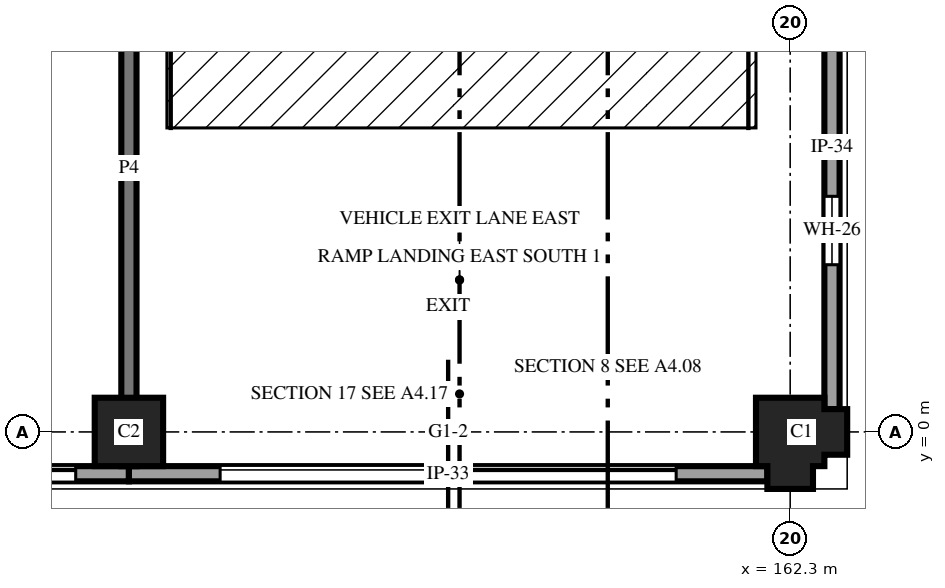
"""IFC4 building model, lengths in metres.
Left out: names, types, materials, properties, quantities, classifications, styles, units other than length and angle.
Written with IfcOpenShell. Run it as: python <this file> out.ifc"""

import sys

from ifc_helpers import new_model, si_unit, direction, frame, frame_2d, origin, place, context, subcontext, project, spatial, polyline, rectangle, outline, extrude, element, fill, save


model = new_model("IFC4")
c1 = context("Model", 3, precision=1e-05, world=origin(), true_north=direction((0.0, 1.0)))
c2 = subcontext(c1, "Body", "Model", "MODEL_VIEW")
j1 = project(units=[si_unit("LENGTHUNIT", "METRE"), si_unit("PLANEANGLEUNIT", "RADIAN")], contexts=[c1])
p1 = place(None, origin())
s1 = spatial("IfcSite", under=j1, at=p1, CompositionType="ELEMENT")
p2 = place(p1, origin())
s2 = spatial("IfcBuilding", under=s1, at=p2, CompositionType="ELEMENT")
p3 = place(p2, origin())
s3 = spatial("IfcBuildingStorey", under=s2, at=p3, CompositionType="ELEMENT", Elevation=0.0)
p4 = place(p3, frame((153.6, 0.0, 0.0), z_axis=(0.0, 0.0, 1.0), x_axis=(1.0, 0.0, 0.0)))
e1 = element("IfcColumn", 1, at=p4, inside=s3, PredefinedType="COLUMN", context=c2, shape_type="SweptSolid", body=[
    extrude(outline(polyline([(-0.45, -0.45), (0.45, -0.45), (0.45, 0.45), (-0.45, 0.45), (-0.45, -0.45)])), origin(), (0.0, 0.0, 1.0), 4.5),
])
p5 = place(p3, frame((162.3, 0.0, 0.0), z_axis=(0.0, 0.0, 1.0), x_axis=(0.0, -1.0, 0.0)))
e2 = element("IfcColumn", 2, at=p5, inside=s3, PredefinedType="COLUMN", context=c2, shape_type="SweptSolid", body=[
    extrude(outline(polyline([(-0.45, -0.45), (0.45, -0.45), (0.45, -0.3), (0.75, -0.3), (0.75, 0.3), (0.45, 0.3), (0.45, 0.45), (0.3, 0.45), (0.3, 0.75), (-0.3, 0.75), (-0.3, 0.45), (-0.45, 0.45), (-0.45, -0.45)])), origin(), (0.0, 0.0, 1.0), 4.5),
])
p6 = place(p3, frame((145.2, -0.55, 0.0), z_axis=(0.0, 0.0, 1.0), x_axis=(1.0, 0.0, 0.0)))
e3 = element("IfcWall", 3, at=p6, inside=s3, PredefinedType="SOLIDWALL", context=c2, shape_type="SweptSolid", body=[
    extrude(outline(polyline([(0.0, 0.0), (8.4, 0.0), (8.4, 2.9), (8.102, 2.9), (8.1, 2.8), (7.613, 2.812), (7.125, 2.822), (6.637, 2.831), (6.15, 2.837), (5.663, 2.843), (5.175, 2.847), (4.688, 2.849), (4.2, 2.85), (3.712, 2.849), (3.225, 2.847), (2.738, 2.843), (2.25, 2.837), (1.762, 2.831), (1.275, 2.822), (0.788, 2.812), (0.3, 2.8), (0.298, 2.9), (0.0, 2.9), (0.0, 0.0)])), frame((0.0, 0.1, 0.0), z_axis=(0.0, -1.0, 0.0), x_axis=(1.0, 0.0, 0.0)), (0.0, 0.0, 1.0), 0.2),
])
p7 = place(p6, frame((2.3, 0.0, 0.0)))
e4 = element("IfcOpeningElement", 4, at=p7, cuts=e3, PredefinedType="OPENING", context=c2, shape_type="SweptSolid", body=[
    extrude(rectangle(XDim=5.4, YDim=2.65, at=frame_2d((2.7, 1.325))), frame((0.0, 0.11, 0.0), z_axis=(0.0, -1.0, 0.0), x_axis=(1.0, 0.0, 0.0)), (0.0, 0.0, 1.0), 0.22),
])
p8 = place(p6, frame((0.7, 0.0, 0.0)))
e5 = element("IfcOpeningElement", 5, at=p8, cuts=e3, PredefinedType="OPENING", context=c2, shape_type="SweptSolid", body=[
    extrude(rectangle(XDim=1.1, YDim=2.1, at=frame_2d((0.55, 1.05))), frame((0.0, 0.11, 0.0), z_axis=(0.0, -1.0, 0.0), x_axis=(1.0, 0.0, 0.0)), (0.0, 0.0, 1.0), 0.22),
])
p9 = place(p3, frame((153.6, -0.55, 0.0), z_axis=(0.0, 0.0, 1.0), x_axis=(1.0, 0.0, 0.0)))
e6 = element("IfcWall", 6, at=p9, inside=s3, PredefinedType="SOLIDWALL", context=c2, shape_type="SweptSolid", body=[
    extrude(outline(polyline([(0.0, 0.0), (8.4, 0.0), (8.4, 2.9), (7.502, 2.9), (7.5, 2.8), (7.087, 2.812), (6.675, 2.822), (6.262, 2.831), (5.85, 2.837), (5.438, 2.843), (5.025, 2.847), (4.613, 2.849), (4.2, 2.85), (3.788, 2.849), (3.375, 2.847), (2.962, 2.843), (2.55, 2.837), (2.137, 2.831), (1.725, 2.822), (1.312, 2.812), (0.9, 2.8), (0.898, 2.9), (0.0, 2.9), (0.0, 0.0)])), frame((0.0, 0.1, 0.0), z_axis=(0.0, -1.0, 0.0), x_axis=(1.0, 0.0, 0.0)), (0.0, 0.0, 1.0), 0.2),
])
p10 = place(p9, frame((1.2, 0.0, 0.0)))
e7 = element("IfcOpeningElement", 7, at=p10, cuts=e6, PredefinedType="OPENING", context=c2, shape_type="SweptSolid", body=[
    extrude(rectangle(XDim=6.0, YDim=2.65, at=frame_2d((3.0, 1.325))), frame((0.0, 0.11, 0.0), z_axis=(0.0, -1.0, 0.0), x_axis=(1.0, 0.0, 0.0)), (0.0, 0.0, 1.0), 0.22),
])
p11 = place(p3, frame((162.85, 0.3, 0.0), z_axis=(0.0, 0.0, 1.0), x_axis=(0.0, 1.0, 0.0)))
e8 = element("IfcWall", 8, at=p11, inside=s3, PredefinedType="SOLIDWALL", context=c2, shape_type="SweptSolid", body=[
    extrude(outline(polyline([(0.0, 0.0), (6.9, 0.0), (6.9, 3.1), (6.002, 3.1), (6.0, 2.4), (5.681, 2.56), (5.363, 2.695), (5.044, 2.806), (4.725, 2.895), (4.406, 2.963), (4.087, 3.012), (3.769, 3.041), (3.45, 3.05), (3.131, 3.041), (2.812, 3.012), (2.494, 2.963), (2.175, 2.895), (1.856, 2.806), (1.538, 2.695), (1.219, 2.56), (0.9, 2.4), (0.898, 3.1), (0.0, 3.1), (0.0, 0.0)])), frame((0.0, 0.1, 0.0), z_axis=(0.0, -1.0, 0.0), x_axis=(1.0, 0.0, 0.0)), (0.0, 0.0, 1.0), 0.2),
])
p12 = place(p11, frame((1.9, 0.0, 2.4)))
e9 = element("IfcOpeningElement", 9, at=p12, cuts=e8, PredefinedType="OPENING", context=c2, shape_type="SweptSolid", body=[
    extrude(rectangle(XDim=0.9, YDim=0.32, at=frame_2d((0.45, 0.16))), frame((0.0, 0.11, 0.0), z_axis=(0.0, -1.0, 0.0), x_axis=(1.0, 0.0, 0.0)), (0.0, 0.0, 1.0), 0.22),
])
p13 = place(p3, frame((153.6, -0.45, 0.0), z_axis=(0.0, 0.0, 1.0), x_axis=(0.0, 1.0, 0.0)))
e10 = element("IfcWall", 10, at=p13, inside=s3, PredefinedType="PARTITIONING", context=c2, shape_type="SweptSolid", body=[
    extrude(rectangle(XDim=7.85, YDim=0.2, at=frame_2d((3.925, 0.0))), origin(), (0.0, 0.0, 1.0), 3.4),
])
p14 = place(p7, frame((5.4, 0.0, 0.0), z_axis=(0.0, 0.0, 1.0), x_axis=(-1.0, 0.0, 0.0)))
e11 = element("IfcDoor", 11, at=p14, inside=s3, OperationType="SINGLE_SWING_LEFT", PredefinedType="GATE", context=c2, shape_type="SweptSolid", body=[
    extrude(rectangle(XDim=5.4, YDim=2.65, at=frame_2d((2.7, 1.325))), frame((0.0, 0.025, 0.0), z_axis=(0.0, -1.0, 0.0), x_axis=(1.0, 0.0, 0.0)), (0.0, 0.0, 1.0), 0.05),
])
fill(e4, e11)
p15 = place(p10, frame((6.0, 0.0, 0.0), z_axis=(0.0, 0.0, 1.0), x_axis=(-1.0, 0.0, 0.0)))
e12 = element("IfcDoor", 12, at=p15, inside=s3, OperationType="SINGLE_SWING_LEFT", PredefinedType="GATE", context=c2, shape_type="SweptSolid", body=[
    extrude(rectangle(XDim=6.0, YDim=2.65, at=frame_2d((3.0, 1.325))), frame((0.0, 0.025, 0.0), z_axis=(0.0, -1.0, 0.0), x_axis=(1.0, 0.0, 0.0)), (0.0, 0.0, 1.0), 0.05),
])
fill(e7, e12)
p16 = place(p12, origin())
e13 = element("IfcWindow", 13, at=p16, inside=s3, PartitioningType="SINGLE_PANEL", PredefinedType="WINDOW", context=c2, shape_type="SweptSolid", body=[
    extrude(rectangle(XDim=0.9, YDim=0.32, at=frame_2d((0.45, 0.16))), frame((0.0, 0.03, 0.0), z_axis=(0.0, -1.0, 0.0), x_axis=(1.0, 0.0, 0.0)), (0.0, 0.0, 1.0), 0.06),
])
fill(e9, e13)
save(model, sys.argv[1])
